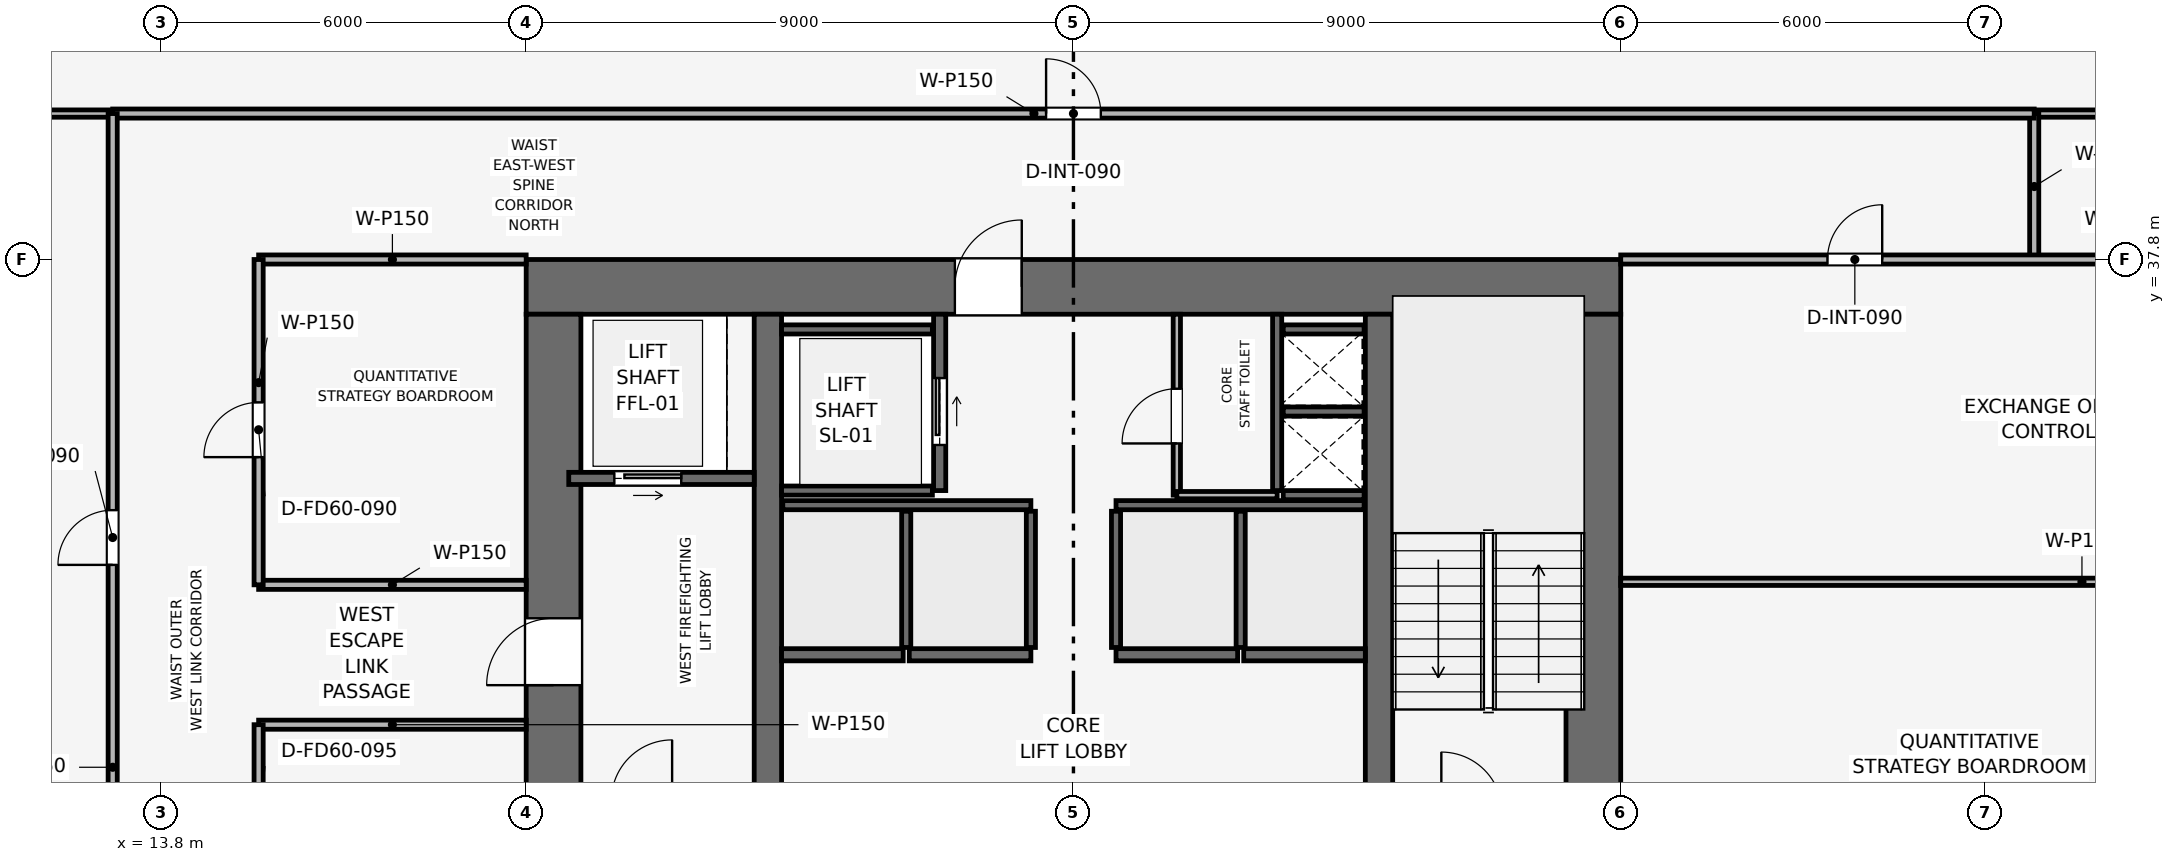
"""IFC4 building model, lengths in metres.
Left out: names, types, materials, properties, quantities, classifications, styles, units other than length and angle.
Written with IfcOpenShell. Run it as: python <this file> out.ifc"""

import sys

from ifc_helpers import new_model, si_unit, direction, frame, frame_2d, origin, place, context, subcontext, project, spatial, rectangle, extrude, element, fill, save


model = new_model("IFC4")
c1 = context("Model", 3, precision=1e-05, world=origin(), true_north=direction((0.0, 1.0)))
c2 = subcontext(c1, "Body", "Model", "MODEL_VIEW")
j1 = project(units=[si_unit("LENGTHUNIT", "METRE"), si_unit("PLANEANGLEUNIT", "RADIAN")], contexts=[c1])
p1 = place(None, origin())
s1 = spatial("IfcSite", under=j1, at=p1, CompositionType="ELEMENT")
p2 = place(p1, origin())
s2 = spatial("IfcBuilding", under=s1, at=p2, CompositionType="ELEMENT")
p3 = place(p2, frame((0.0, 0.0, 160.8)))
s3 = spatial("IfcBuildingStorey", under=s2, at=p3, CompositionType="ELEMENT", Elevation=160.8)
p4 = place(p3, frame((19.8, 37.35, 0.0), z_axis=(0.0, 0.0, 1.0), x_axis=(1.0, 0.0, 0.0)))
e1 = element("IfcWall", 1, at=p4, inside=s3, PredefinedType="SHEAR", context=c2, shape_type="SweptSolid", body=[
    extrude(rectangle(XDim=18.0, YDim=0.9, at=frame_2d((9.0, 0.0))), origin(), (0.0, 0.0, 1.0), 3.75),
])
p5 = place(p4, frame((7.05, 0.0, 0.0)))
e2 = element("IfcOpeningElement", 2, at=p5, cuts=e1, PredefinedType="OPENING", context=c2, shape_type="SweptSolid", body=[
    extrude(rectangle(XDim=1.1, YDim=2.15, at=frame_2d((0.55, 1.075))), frame((0.0, 0.46, 0.0), z_axis=(0.0, -1.0, 0.0), x_axis=(1.0, 0.0, 0.0)), (0.0, 0.0, 1.0), 0.92),
])
p6 = place(p3, frame((20.25, 20.7, 0.0), z_axis=(0.0, 0.0, 1.0), x_axis=(0.0, 1.0, 0.0)))
e3 = element("IfcWall", 3, at=p6, inside=s3, PredefinedType="SHEAR", context=c2, shape_type="SweptSolid", body=[
    extrude(rectangle(XDim=16.2, YDim=0.9, at=frame_2d((8.1, 0.0))), origin(), (0.0, 0.0, 1.0), 3.75),
])
p7 = place(p6, frame((10.1, 0.0, 0.0)))
e4 = element("IfcOpeningElement", 4, at=p7, cuts=e3, PredefinedType="OPENING", context=c2, shape_type="SweptSolid", body=[
    extrude(rectangle(XDim=1.1, YDim=2.15, at=frame_2d((0.55, 1.075))), frame((0.0, 0.46, 0.0), z_axis=(0.0, -1.0, 0.0), x_axis=(1.0, 0.0, 0.0)), (0.0, 0.0, 1.0), 0.92),
])
p8 = place(p3, frame((37.35, 20.7, 0.0), z_axis=(0.0, 0.0, 1.0), x_axis=(0.0, 1.0, 0.0)))
e5 = element("IfcWall", 5, at=p8, inside=s3, PredefinedType="SHEAR", context=c2, shape_type="SweptSolid", body=[
    extrude(rectangle(XDim=16.2, YDim=0.9, at=frame_2d((8.1, 0.0))), origin(), (0.0, 0.0, 1.0), 3.75),
])
p9 = place(p8, frame((4.6, 0.0, 0.0)))
e6 = element("IfcOpeningElement", 6, at=p9, cuts=e5, PredefinedType="OPENING", context=c2, shape_type="SweptSolid", body=[
    extrude(rectangle(XDim=1.1, YDim=2.15, at=frame_2d((0.55, 1.075))), frame((0.0, 0.46, 0.0), z_axis=(0.0, -1.0, 0.0), x_axis=(1.0, 0.0, 0.0)), (0.0, 0.0, 1.0), 0.92),
])
for number, where, z_axis, x_axis in (
    (7, (23.775, 20.7, 0.0), (0.0, 0.0, 1.0), (0.0, 1.0, 0.0)),
    (8, (33.825, 20.7, 0.0), (0.0, 0.0, 1.0), (0.0, 1.0, 0.0)),
):
    element("IfcWall", number, at=place(p3, frame(where, z_axis=z_axis, x_axis=x_axis)), inside=s3, PredefinedType="SHEAR", context=c2, shape_type="SweptSolid", body=[
        extrude(rectangle(XDim=16.2, YDim=0.45, at=frame_2d((8.1, 0.0))), origin(), (0.0, 0.0, 1.0), 3.75),
    ])
p10 = place(p3, frame((32.15, 34.0, 0.0), z_axis=(0.0, 0.0, 1.0), x_axis=(0.0, 1.0, 0.0)))
e9 = element("IfcWall", 9, at=p10, inside=s3, PredefinedType="SHEAR", context=c2, shape_type="SweptSolid", body=[
    extrude(rectangle(XDim=2.9, YDim=0.15, at=frame_2d((1.45, 0.0))), origin(), (0.0, 0.0, 1.0), 3.495),
])
for number, where, z_axis, x_axis in (
    (10, (32.25, 33.925, 0.0), (0.0, 0.0, 1.0), (1.0, 0.0, 0.0)),
    (11, (32.25, 35.3, 0.0), (0.0, 0.0, 1.0), (1.0, 0.0, 0.0)),
):
    element("IfcWall", number, at=place(p3, frame(where, z_axis=z_axis, x_axis=x_axis)), inside=s3, PredefinedType="SHEAR", context=c2, shape_type="SweptSolid", body=[
        extrude(rectangle(XDim=1.33, YDim=0.15, at=frame_2d((0.665, 0.0))), origin(), (0.0, 0.0, 1.0), 3.495),
    ])
p11 = place(p3, frame((20.5, 34.2, 0.0), z_axis=(0.0, 0.0, 1.0), x_axis=(1.0, 0.0, 0.0)))
e12 = element("IfcWall", 12, at=p11, inside=s3, PredefinedType="SHEAR", context=c2, shape_type="SweptSolid", body=[
    extrude(rectangle(XDim=3.05, YDim=0.2, at=frame_2d((1.525, 0.0))), origin(), (0.0, 0.0, 1.0), 3.495),
])
p12 = place(p11, frame((0.75, 0.0, 0.0)))
e13 = element("IfcOpeningElement", 13, at=p12, cuts=e12, PredefinedType="OPENING", context=c2, shape_type="SweptSolid", body=[
    extrude(rectangle(XDim=1.1, YDim=2.15, at=frame_2d((0.55, 1.075))), frame((0.0, 0.11, 0.0), z_axis=(0.0, -1.0, 0.0), x_axis=(1.0, 0.0, 0.0)), (0.0, 0.0, 1.0), 0.22),
])
p13 = place(p3, frame((26.6, 34.0, 0.0), z_axis=(0.0, 0.0, 1.0), x_axis=(0.0, 1.0, 0.0)))
e14 = element("IfcWall", 14, at=p13, inside=s3, PredefinedType="SHEAR", context=c2, shape_type="SweptSolid", body=[
    extrude(rectangle(XDim=2.9, YDim=0.2, at=frame_2d((1.45, 0.0))), origin(), (0.0, 0.0, 1.0), 3.495),
])
p14 = place(p13, frame((0.75, 0.0, 0.0)))
e15 = element("IfcOpeningElement", 15, at=p14, cuts=e14, PredefinedType="OPENING", context=c2, shape_type="SweptSolid", body=[
    extrude(rectangle(XDim=1.1, YDim=2.15, at=frame_2d((0.55, 1.075))), frame((0.0, 0.11, 0.0), z_axis=(0.0, -1.0, 0.0), x_axis=(1.0, 0.0, 0.0)), (0.0, 0.0, 1.0), 0.22),
])
for number, where, z_axis, x_axis in (
    (16, (24.0, 34.0, 0.0), (0.0, 0.0, 1.0), (1.0, 0.0, 0.0)),
    (17, (24.0, 36.65, 0.0), (0.0, 0.0, 1.0), (1.0, 0.0, 0.0)),
):
    element("IfcWall", number, at=place(p3, frame(where, z_axis=z_axis, x_axis=x_axis)), inside=s3, PredefinedType="SHEAR", context=c2, shape_type="SweptSolid", body=[
        extrude(rectangle(XDim=2.48, YDim=0.15, at=frame_2d((1.24, 0.0))), origin(), (0.0, 0.0, 1.0), 3.495),
    ])
for number, where, z_axis, x_axis in (
    (18, (24.0, 31.3, 0.0), (0.0, 0.0, 1.0), (1.0, 0.0, 0.0)),
    (19, (26.1, 31.3, 0.0), (0.0, 0.0, 1.0), (1.0, 0.0, 0.0)),
    (20, (29.5, 31.3, 0.0), (0.0, 0.0, 1.0), (1.0, 0.0, 0.0)),
    (21, (31.6, 31.3, 0.0), (0.0, 0.0, 1.0), (1.0, 0.0, 0.0)),
):
    element("IfcWall", number, at=place(p3, frame(where, z_axis=z_axis, x_axis=x_axis)), inside=s3, PredefinedType="SHEAR", context=c2, shape_type="SweptSolid", body=[
        extrude(rectangle(XDim=2.0, YDim=0.2, at=frame_2d((1.0, 0.0))), origin(), (0.0, 0.0, 1.0), 3.495),
    ])
p15 = place(p3, frame((32.25, 36.65, 0.0), z_axis=(0.0, 0.0, 1.0), x_axis=(1.0, 0.0, 0.0)))
e22 = element("IfcWall", 22, at=p15, inside=s3, PredefinedType="SHEAR", context=c2, shape_type="SweptSolid", body=[
    extrude(rectangle(XDim=1.33, YDim=0.15, at=frame_2d((0.665, 0.0))), origin(), (0.0, 0.0, 1.0), 3.495),
])
for number, where, z_axis, x_axis in (
    (23, (24.02, 33.76, 0.0), (0.0, 0.0, 1.0), (1.0, 0.0, 0.0)),
    (24, (29.5, 33.76, 0.0), (0.0, 0.0, 1.0), (1.0, 0.0, 0.0)),
):
    element("IfcWall", number, at=place(p3, frame(where, z_axis=z_axis, x_axis=x_axis)), inside=s3, PredefinedType="SHEAR", context=c2, shape_type="SweptSolid", body=[
        extrude(rectangle(XDim=4.08, YDim=0.15, at=frame_2d((2.04, 0.0))), origin(), (0.0, 0.0, 1.0), 3.495),
    ])
for number, where, z_axis, x_axis in (
    (25, (26.05, 31.42, 0.0), (0.0, 0.0, 1.0), (0.0, 1.0, 0.0)),
    (26, (28.1, 31.42, 0.0), (0.0, 0.0, 1.0), (0.0, 1.0, 0.0)),
    (27, (29.5, 31.42, 0.0), (0.0, 0.0, 1.0), (0.0, 1.0, 0.0)),
    (28, (31.55, 31.42, 0.0), (0.0, 0.0, 1.0), (0.0, 1.0, 0.0)),
):
    element("IfcWall", number, at=place(p3, frame(where, z_axis=z_axis, x_axis=x_axis)), inside=s3, PredefinedType="SHEAR", context=c2, shape_type="SweptSolid", body=[
        extrude(rectangle(XDim=2.24, YDim=0.15, at=frame_2d((1.12, 0.0))), origin(), (0.0, 0.0, 1.0), 3.495),
    ])
p16 = place(p3, frame((30.5, 33.925, 0.0), z_axis=(0.0, 0.0, 1.0), x_axis=(0.0, 1.0, 0.0)))
e29 = element("IfcWall", 29, at=p16, inside=s3, PredefinedType="PARTITIONING", context=c2, shape_type="SweptSolid", body=[
    extrude(rectangle(XDim=2.975, YDim=0.12, at=frame_2d((1.487, 0.0))), origin(), (0.0, 0.0, 1.0), 3.495),
])
p17 = place(p16, frame((0.85, 0.0, 0.0)))
e30 = element("IfcOpeningElement", 30, at=p17, cuts=e29, PredefinedType="OPENING", context=c2, shape_type="SweptSolid", body=[
    extrude(rectangle(XDim=0.9, YDim=2.1, at=frame_2d((0.45, 1.05))), frame((0.0, 0.07, 0.0), z_axis=(0.0, -1.0, 0.0), x_axis=(1.0, 0.0, 0.0)), (0.0, 0.0, 1.0), 0.14),
])
p18 = place(p3, frame((30.5, 33.925, 0.0), z_axis=(0.0, 0.0, 1.0), x_axis=(1.0, 0.0, 0.0)))
e31 = element("IfcWall", 31, at=p18, inside=s3, PredefinedType="PARTITIONING", context=c2, shape_type="SweptSolid", body=[
    extrude(rectangle(XDim=1.65, YDim=0.12, at=frame_2d((0.825, 0.0))), origin(), (0.0, 0.0, 1.0), 3.495),
])
for number, where, z_axis, x_axis in (
    (32, (15.4, 30.15, 0.0), (0.0, 0.0, 1.0), (1.0, 0.0, 0.0)),
    (33, (15.4, 32.45, 0.0), (0.0, 0.0, 1.0), (1.0, 0.0, 0.0)),
):
    element("IfcWall", number, at=place(p3, frame(where, z_axis=z_axis, x_axis=x_axis)), inside=s3, PredefinedType="PARTITIONING", context=c2, shape_type="SweptSolid", body=[
        extrude(rectangle(XDim=4.4, YDim=0.15, at=frame_2d((2.2, 0.0))), origin(), (0.0, 0.0, 1.0), 3.495),
    ])
p19 = place(p3, frame((15.4, 37.8, 0.0), z_axis=(0.0, 0.0, 1.0), x_axis=(1.0, 0.0, 0.0)))
e34 = element("IfcWall", 34, at=p19, inside=s3, PredefinedType="PARTITIONING", context=c2, shape_type="SweptSolid", body=[
    extrude(rectangle(XDim=4.4, YDim=0.15, at=frame_2d((2.2, 0.0))), origin(), (0.0, 0.0, 1.0), 3.03),
])
p20 = place(p3, frame((15.4, 19.8, 0.0), z_axis=(0.0, 0.0, 1.0), x_axis=(0.0, 1.0, 0.0)))
e35 = element("IfcWall", 35, at=p20, inside=s3, PredefinedType="PARTITIONING", context=c2, shape_type="SweptSolid", body=[
    extrude(rectangle(XDim=10.35, YDim=0.15, at=frame_2d((5.175, 0.0))), origin(), (0.0, 0.0, 1.0), 3.03),
])
p21 = place(p20, frame((1.2, 0.0, 0.0)))
e36 = element("IfcOpeningElement", 36, at=p21, cuts=e35, PredefinedType="OPENING", context=c2, shape_type="SweptSolid", body=[
    extrude(rectangle(XDim=0.9, YDim=2.1, at=frame_2d((0.45, 1.05))), frame((0.0, 0.085, 0.0), z_axis=(0.0, -1.0, 0.0), x_axis=(1.0, 0.0, 0.0)), (0.0, 0.0, 1.0), 0.17),
])
p22 = place(p20, frame((4.7, 0.0, 0.0)))
e37 = element("IfcOpeningElement", 37, at=p22, cuts=e35, PredefinedType="OPENING", context=c2, shape_type="SweptSolid", body=[
    extrude(rectangle(XDim=0.9, YDim=2.1, at=frame_2d((0.45, 1.05))), frame((0.0, 0.085, 0.0), z_axis=(0.0, -1.0, 0.0), x_axis=(1.0, 0.0, 0.0)), (0.0, 0.0, 1.0), 0.17),
])
p23 = place(p20, frame((8.1, 0.0, 0.0)))
e38 = element("IfcOpeningElement", 38, at=p23, cuts=e35, PredefinedType="OPENING", context=c2, shape_type="SweptSolid", body=[
    extrude(rectangle(XDim=0.95, YDim=2.1, at=frame_2d((0.475, 1.05))), frame((0.0, 0.085, 0.0), z_axis=(0.0, -1.0, 0.0), x_axis=(1.0, 0.0, 0.0)), (0.0, 0.0, 1.0), 0.17),
])
p24 = place(p3, frame((15.4, 32.45, 0.0), z_axis=(0.0, 0.0, 1.0), x_axis=(0.0, 1.0, 0.0)))
e39 = element("IfcWall", 39, at=p24, inside=s3, PredefinedType="PARTITIONING", context=c2, shape_type="SweptSolid", body=[
    extrude(rectangle(XDim=5.35, YDim=0.15, at=frame_2d((2.675, 0.0))), origin(), (0.0, 0.0, 1.0), 3.03),
])
p25 = place(p24, frame((2.1, 0.0, 0.0)))
e40 = element("IfcOpeningElement", 40, at=p25, cuts=e39, PredefinedType="OPENING", context=c2, shape_type="SweptSolid", body=[
    extrude(rectangle(XDim=0.9, YDim=2.1, at=frame_2d((0.45, 1.05))), frame((0.0, 0.085, 0.0), z_axis=(0.0, -1.0, 0.0), x_axis=(1.0, 0.0, 0.0)), (0.0, 0.0, 1.0), 0.17),
])
p26 = place(p3, frame((37.8, 32.5, 0.0), z_axis=(0.0, 0.0, 1.0), x_axis=(1.0, 0.0, 0.0)))
e41 = element("IfcWall", 41, at=p26, inside=s3, PredefinedType="PARTITIONING", context=c2, shape_type="SweptSolid", body=[
    extrude(rectangle(XDim=15.17, YDim=0.12, at=frame_2d((7.585, 0.0))), origin(), (0.0, 0.0, 1.0), 2.98),
])
p27 = place(p3, frame((4.63, 40.2, 0.0), z_axis=(0.0, 0.0, 1.0), x_axis=(1.0, 0.0, 0.0)))
e42 = element("IfcWall", 42, at=p27, inside=s3, PredefinedType="PARTITIONING", context=c2, shape_type="SweptSolid", body=[
    extrude(rectangle(XDim=8.37, YDim=0.12, at=frame_2d((4.185, 0.0))), origin(), (0.0, 0.0, 1.0), 2.98),
])
p28 = place(p3, frame((44.6, 40.2, 0.0), z_axis=(0.0, 0.0, 1.0), x_axis=(1.0, 0.0, 0.0)))
e43 = element("IfcWall", 43, at=p28, inside=s3, PredefinedType="PARTITIONING", context=c2, shape_type="SweptSolid", body=[
    extrude(rectangle(XDim=8.37, YDim=0.12, at=frame_2d((4.185, 0.0))), origin(), (0.0, 0.0, 1.0), 2.98),
])
p29 = place(p3, frame((44.6, 37.8, 0.0), z_axis=(0.0, 0.0, 1.0), x_axis=(0.0, 1.0, 0.0)))
e44 = element("IfcWall", 44, at=p29, inside=s3, PredefinedType="PARTITIONING", context=c2, shape_type="SweptSolid", body=[
    extrude(rectangle(XDim=2.4, YDim=0.15, at=frame_2d((1.2, 0.0))), origin(), (0.0, 0.0, 1.0), 3.495),
])
p30 = place(p3, frame((37.8, 37.8, 0.0), z_axis=(0.0, 0.0, 1.0), x_axis=(1.0, 0.0, 0.0)))
e45 = element("IfcWall", 45, at=p30, inside=s3, PredefinedType="PARTITIONING", context=c2, shape_type="SweptSolid", body=[
    extrude(rectangle(XDim=15.17, YDim=0.15, at=frame_2d((7.585, 0.0))), origin(), (0.0, 0.0, 1.0), 2.98),
])
p31 = place(p30, frame((3.4, 0.0, 0.0)))
e46 = element("IfcOpeningElement", 46, at=p31, cuts=e45, PredefinedType="OPENING", context=c2, shape_type="SweptSolid", body=[
    extrude(rectangle(XDim=0.9, YDim=2.1, at=frame_2d((0.45, 1.05))), frame((0.0, 0.085, 0.0), z_axis=(0.0, -1.0, 0.0), x_axis=(1.0, 0.0, 0.0)), (0.0, 0.0, 1.0), 0.17),
])
p32 = place(p3, frame((13.0, 40.2, 0.0), z_axis=(0.0, 0.0, 1.0), x_axis=(1.0, 0.0, 0.0)))
e47 = element("IfcWall", 47, at=p32, inside=s3, PredefinedType="PARTITIONING", context=c2, shape_type="SweptSolid", body=[
    extrude(rectangle(XDim=31.6, YDim=0.15, at=frame_2d((15.8, 0.0))), origin(), (0.0, 0.0, 1.0), 3.03),
])
p33 = place(p32, frame((15.35, 0.0, 0.0)))
e48 = element("IfcOpeningElement", 48, at=p33, cuts=e47, PredefinedType="OPENING", context=c2, shape_type="SweptSolid", body=[
    extrude(rectangle(XDim=0.9, YDim=2.1, at=frame_2d((0.45, 1.05))), frame((0.0, 0.085, 0.0), z_axis=(0.0, -1.0, 0.0), x_axis=(1.0, 0.0, 0.0)), (0.0, 0.0, 1.0), 0.17),
])
p34 = place(p3, frame((13.0, 17.4, 0.0), z_axis=(0.0, 0.0, 1.0), x_axis=(0.0, 1.0, 0.0)))
e49 = element("IfcWall", 49, at=p34, inside=s3, PredefinedType="PARTITIONING", context=c2, shape_type="SweptSolid", body=[
    extrude(rectangle(XDim=22.8, YDim=0.15, at=frame_2d((11.4, 0.0))), origin(), (0.0, 0.0, 1.0), 3.03),
])
p35 = place(p34, frame((3.113, 0.0, 0.0)))
e50 = element("IfcOpeningElement", 50, at=p35, cuts=e49, PredefinedType="OPENING", context=c2, shape_type="SweptSolid", body=[
    extrude(rectangle(XDim=0.9, YDim=2.1, at=frame_2d((0.45, 1.05))), frame((0.0, 0.085, 0.0), z_axis=(0.0, -1.0, 0.0), x_axis=(1.0, 0.0, 0.0)), (0.0, 0.0, 1.0), 0.17),
])
p36 = place(p34, frame((7.542, 0.0, 0.0)))
e51 = element("IfcOpeningElement", 51, at=p36, cuts=e49, PredefinedType="OPENING", context=c2, shape_type="SweptSolid", body=[
    extrude(rectangle(XDim=0.9, YDim=2.1, at=frame_2d((0.45, 1.05))), frame((0.0, 0.085, 0.0), z_axis=(0.0, -1.0, 0.0), x_axis=(1.0, 0.0, 0.0)), (0.0, 0.0, 1.0), 0.17),
])
p37 = place(p34, frame((15.378, 0.0, 0.0)))
e52 = element("IfcOpeningElement", 52, at=p37, cuts=e49, PredefinedType="OPENING", context=c2, shape_type="SweptSolid", body=[
    extrude(rectangle(XDim=0.9, YDim=2.1, at=frame_2d((0.45, 1.05))), frame((0.0, 0.085, 0.0), z_axis=(0.0, -1.0, 0.0), x_axis=(1.0, 0.0, 0.0)), (0.0, 0.0, 1.0), 0.17),
])
p38 = place(p12, origin())
e53 = element("IfcDoor", 53, at=p38, inside=s3, OperationType="SLIDING_TO_RIGHT", PredefinedType="DOOR", context=c2, shape_type="SweptSolid", body=[
    extrude(rectangle(XDim=1.1, YDim=2.15, at=frame_2d((0.55, 1.075))), frame((0.0, 0.025, 0.0), z_axis=(0.0, -1.0, 0.0), x_axis=(1.0, 0.0, 0.0)), (0.0, 0.0, 1.0), 0.05),
])
fill(e13, e53)
p39 = place(p14, origin())
e54 = element("IfcDoor", 54, at=p39, inside=s3, OperationType="SLIDING_TO_RIGHT", PredefinedType="DOOR", context=c2, shape_type="SweptSolid", body=[
    extrude(rectangle(XDim=1.1, YDim=2.15, at=frame_2d((0.55, 1.075))), frame((0.0, 0.025, 0.0), z_axis=(0.0, -1.0, 0.0), x_axis=(1.0, 0.0, 0.0)), (0.0, 0.0, 1.0), 0.05),
])
fill(e15, e54)
p40 = place(p17, origin())
e55 = element("IfcDoor", 55, at=p40, inside=s3, OperationType="SINGLE_SWING_LEFT", PredefinedType="DOOR", context=c2, shape_type="SweptSolid", body=[
    extrude(rectangle(XDim=0.9, YDim=2.1, at=frame_2d((0.45, 1.05))), frame((0.0, 0.025, 0.0), z_axis=(0.0, -1.0, 0.0), x_axis=(1.0, 0.0, 0.0)), (0.0, 0.0, 1.0), 0.05),
])
fill(e30, e55)
p41 = place(p25, origin())
e56 = element("IfcDoor", 56, at=p41, inside=s3, OperationType="SINGLE_SWING_LEFT", PredefinedType="DOOR", context=c2, shape_type="SweptSolid", body=[
    extrude(rectangle(XDim=0.9, YDim=2.1, at=frame_2d((0.45, 1.05))), frame((0.0, 0.025, 0.0), z_axis=(0.0, -1.0, 0.0), x_axis=(1.0, 0.0, 0.0)), (0.0, 0.0, 1.0), 0.05),
])
fill(e40, e56)
p42 = place(p31, origin())
e57 = element("IfcDoor", 57, at=p42, inside=s3, OperationType="SINGLE_SWING_RIGHT", PredefinedType="DOOR", context=c2, shape_type="SweptSolid", body=[
    extrude(rectangle(XDim=0.9, YDim=2.1, at=frame_2d((0.45, 1.05))), frame((0.0, 0.025, 0.0), z_axis=(0.0, -1.0, 0.0), x_axis=(1.0, 0.0, 0.0)), (0.0, 0.0, 1.0), 0.05),
])
fill(e46, e57)
p43 = place(p33, origin())
e58 = element("IfcDoor", 58, at=p43, inside=s3, OperationType="SINGLE_SWING_LEFT", PredefinedType="DOOR", context=c2, shape_type="SweptSolid", body=[
    extrude(rectangle(XDim=0.9, YDim=2.1, at=frame_2d((0.45, 1.05))), frame((0.0, 0.025, 0.0), z_axis=(0.0, -1.0, 0.0), x_axis=(1.0, 0.0, 0.0)), (0.0, 0.0, 1.0), 0.05),
])
fill(e48, e58)
p44 = place(p37, origin())
e59 = element("IfcDoor", 59, at=p44, inside=s3, OperationType="SINGLE_SWING_LEFT", PredefinedType="DOOR", context=c2, shape_type="SweptSolid", body=[
    extrude(rectangle(XDim=0.9, YDim=2.1, at=frame_2d((0.45, 1.05))), frame((0.0, 0.025, 0.0), z_axis=(0.0, -1.0, 0.0), x_axis=(1.0, 0.0, 0.0)), (0.0, 0.0, 1.0), 0.05),
])
fill(e52, e59)
p45 = place(p7, origin())
e60 = element("IfcDoor", 60, at=p45, inside=s3, OperationType="SINGLE_SWING_LEFT", PredefinedType="DOOR", context=c2, shape_type="SweptSolid", body=[
    extrude(rectangle(XDim=1.1, YDim=2.15, at=frame_2d((0.55, 1.075))), frame((0.0, 0.025, 0.0), z_axis=(0.0, -1.0, 0.0), x_axis=(1.0, 0.0, 0.0)), (0.0, 0.0, 1.0), 0.05),
])
fill(e4, e60)
p46 = place(p5, origin())
e61 = element("IfcDoor", 61, at=p46, inside=s3, OperationType="SINGLE_SWING_RIGHT", PredefinedType="DOOR", context=c2, shape_type="SweptSolid", body=[
    extrude(rectangle(XDim=1.1, YDim=2.15, at=frame_2d((0.55, 1.075))), frame((0.0, 0.025, 0.0), z_axis=(0.0, -1.0, 0.0), x_axis=(1.0, 0.0, 0.0)), (0.0, 0.0, 1.0), 0.05),
])
fill(e2, e61)
save(model, sys.argv[1])
